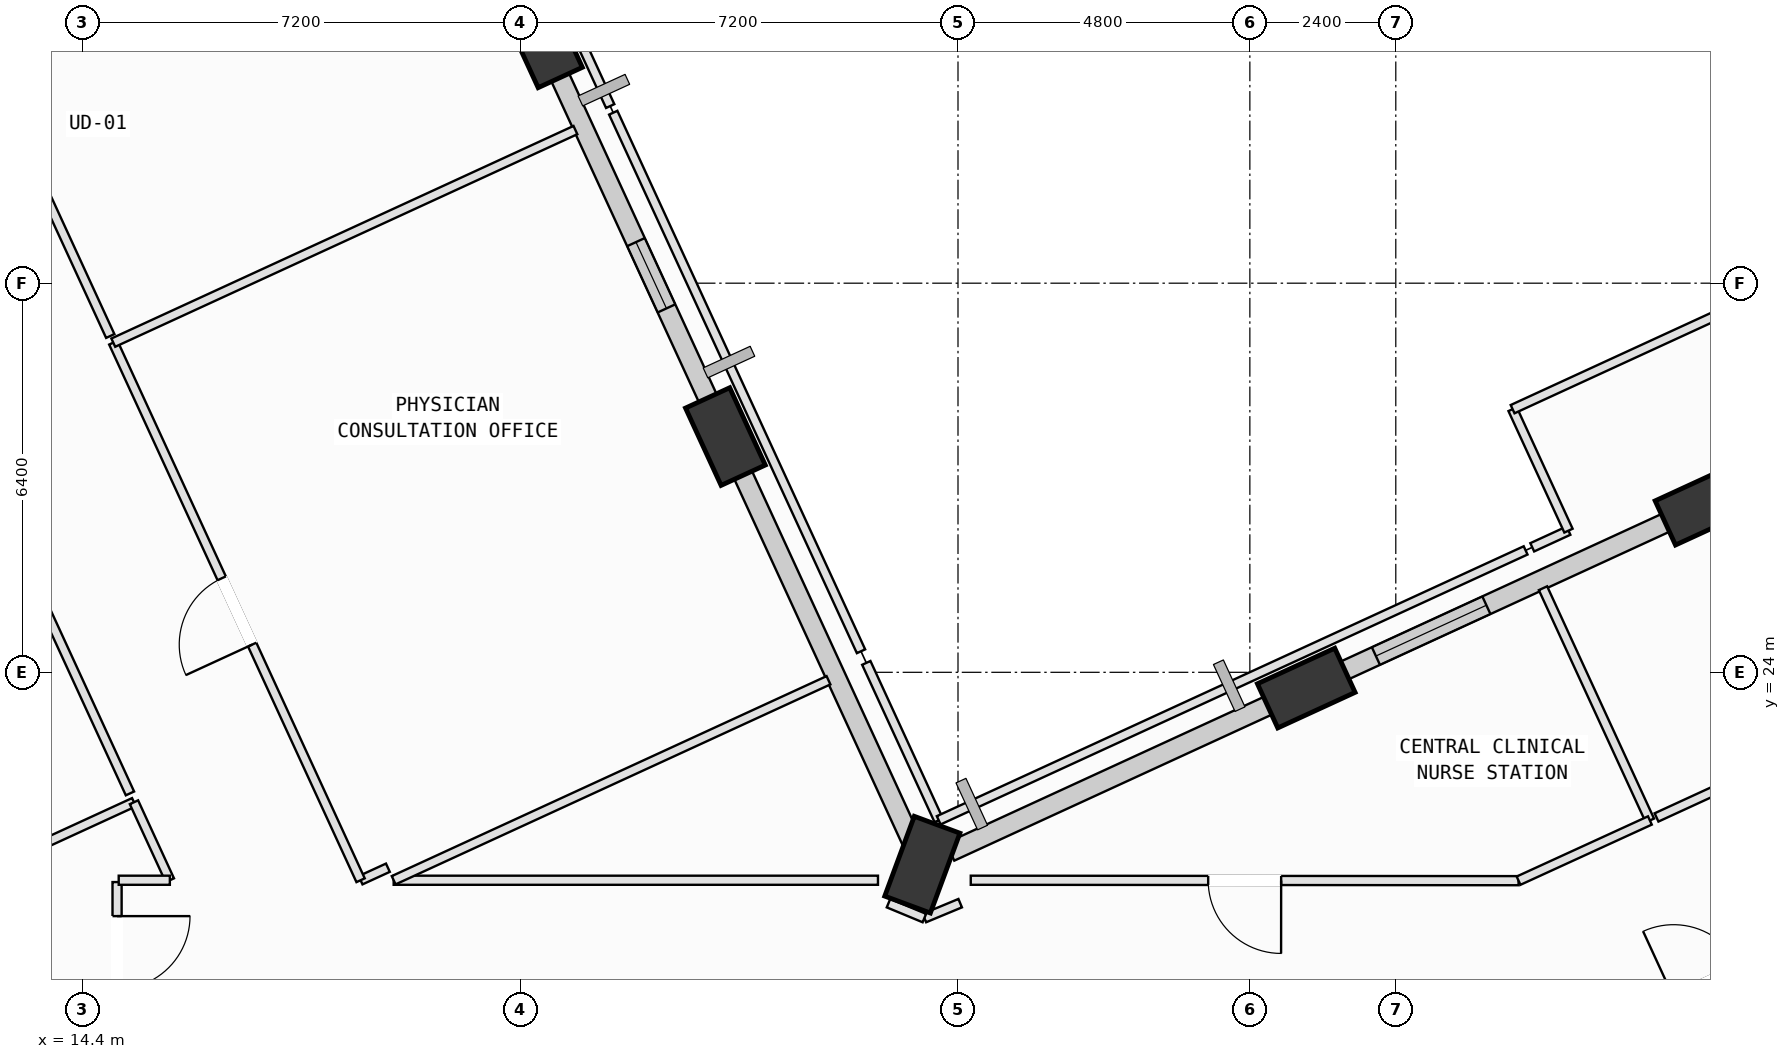
"""IFC4 building model, lengths in metres.
Left out: names, types, materials, properties, quantities, classifications, styles, units other than length and angle.
Written with IfcOpenShell. Run it as: python <this file> out.ifc"""

import sys

from ifc_helpers import new_model, si_unit, direction, frame, frame_2d, origin, origin_2d, place, context, subcontext, project, spatial, rectangle, extrude, element, fill, save


model = new_model("IFC4")
c1 = context("Model", 3, precision=1e-05, world=origin(), true_north=direction((0.0, 1.0)))
c2 = subcontext(c1, "Body", "Model", "MODEL_VIEW")
j1 = project(units=[si_unit("LENGTHUNIT", "METRE"), si_unit("PLANEANGLEUNIT", "RADIAN")], contexts=[c1])
p1 = place(None, origin())
s1 = spatial("IfcSite", under=j1, at=p1, CompositionType="ELEMENT")
p2 = place(p1, origin())
s2 = spatial("IfcBuilding", under=s1, at=p2, CompositionType="ELEMENT")
p3 = place(p2, frame((0.0, 0.0, 128.4)))
s3 = spatial("IfcBuildingStorey", under=s2, at=p3, CompositionType="ELEMENT", Elevation=128.4)
p4 = place(p3, frame((41.069, 26.749, 0.002), z_axis=(-0.0083651903, 0.030896250305, 0.999487591373), x_axis=(-0.76778425247, -0.640568841892, 0.013375367549)))
e1 = element("IfcColumn", 1, at=p4, inside=s3, PredefinedType="COLUMN", context=c2, shape_type="SweptSolid", body=[
    extrude(rectangle(XDim=1.4, YDim=0.8, at=origin_2d()), origin(), (0.0, 0.0, 1.0), 3.998),
])
p5 = place(p3, frame((34.528, 23.741, 0.002), z_axis=(0.004337394239, 0.003848673761, 0.999983187219), x_axis=(-0.915540928611, 0.402217524022, 0.002423098657)))
e2 = element("IfcColumn", 2, at=p5, inside=s3, PredefinedType="COLUMN", context=c2, shape_type="SweptSolid", body=[
    extrude(rectangle(XDim=1.4, YDim=0.8, at=origin_2d()), origin(), (0.0, 0.0, 1.0), 3.996),
])
p6 = place(p3, frame((28.213, 20.836, 0.002), z_axis=(0.016610399314, -0.022167554967, 0.999616273448), x_axis=(-0.284546396124, 0.958310178837, 0.025979791964)))
e3 = element("IfcColumn", 3, at=p6, inside=s3, PredefinedType="COLUMN", context=c2, shape_type="SweptSolid", body=[
    extrude(rectangle(XDim=1.4, YDim=0.8, at=origin_2d()), origin(), (0.0, 0.0, 1.0), 3.998),
])
p7 = place(p3, frame((24.975, 27.877, 0.002), z_axis=(-0.012453610314, -0.035834653208, 0.999280133506), x_axis=(-0.096688222569, 0.994717788265, 0.034466060499)))
e4 = element("IfcColumn", 4, at=p7, inside=s3, PredefinedType="COLUMN", context=c2, shape_type="SweptSolid", body=[
    extrude(rectangle(XDim=1.4, YDim=0.8, at=origin_2d()), origin(), (0.0, 0.0, 1.0), 3.999),
])
p8 = place(p3, frame((21.966, 34.419, 0.002), z_axis=(-0.039387790882, -0.048472590946, 0.998047598993), x_axis=(0.247513343788, 0.9672214419, 0.056743519237)))
e5 = element("IfcColumn", 5, at=p8, inside=s3, PredefinedType="COLUMN", context=c2, shape_type="SweptSolid", body=[
    extrude(rectangle(XDim=1.4, YDim=0.8, at=origin_2d()), origin(), (0.0, 0.0, 1.0), 4.004),
])
p9 = place(p3, frame((34.989, 23.953, 0.0), z_axis=(0.0, 0.0, 1.0), x_axis=(0.908505077116, 0.417873814512, 0.0)))
e6 = element("IfcWall", 6, at=p9, inside=s3, PredefinedType="SOLIDWALL", context=c2, shape_type="SweptSolid", body=[
    extrude(rectangle(XDim=6.211, YDim=0.32, at=frame_2d((3.105, 0.0))), origin(), (0.0, 0.0, 1.0), 3.165),
])
p10 = place(p9, frame((0.753, 0.0, 0.75)))
e7 = element("IfcOpeningElement", 7, at=p10, cuts=e6, PredefinedType="OPENING", context=c2, shape_type="SweptSolid", body=[
    extrude(rectangle(XDim=2.0, YDim=1.95, at=frame_2d((1.0, 0.975))), frame((0.0, 0.17, 0.0), z_axis=(0.0, -1.0, 0.0), x_axis=(1.0, 0.0, 0.0)), (0.0, 0.0, 1.0), 0.34),
])
p11 = place(p3, frame((28.672, 21.048, 0.0), z_axis=(0.0, 0.0, 1.0), x_axis=(0.908511291262, 0.417860303989, 0.0)))
e8 = element("IfcWall", 8, at=p11, inside=s3, PredefinedType="SOLIDWALL", context=c2, shape_type="SweptSolid", body=[
    extrude(rectangle(XDim=5.96, YDim=0.32, at=frame_2d((2.98, 0.0))), origin(), (0.0, 0.0, 1.0), 3.165),
])
p12 = place(p3, frame((25.204, 27.379, 0.0), z_axis=(0.0, 0.0, 1.0), x_axis=(0.417853145671, -0.908514583621, 0.0)))
e9 = element("IfcWall", 9, at=p12, inside=s3, PredefinedType="SOLIDWALL", context=c2, shape_type="SweptSolid", body=[
    extrude(rectangle(XDim=6.76, YDim=0.32, at=frame_2d((3.38, 0.0))), origin(), (0.0, 0.0, 1.0), 3.165),
])
p13 = place(p3, frame((22.191, 33.929, 0.0), z_axis=(0.0, 0.0, 1.0), x_axis=(0.417833720383, -0.908523517643, 0.0)))
e10 = element("IfcWall", 10, at=p13, inside=s3, PredefinedType="SOLIDWALL", context=c2, shape_type="SweptSolid", body=[
    extrude(rectangle(XDim=6.223, YDim=0.32, at=frame_2d((3.111, 0.0))), origin(), (0.0, 0.0, 1.0), 3.165),
])
p14 = place(p13, frame((3.141, 0.0, 0.75)))
e11 = element("IfcOpeningElement", 11, at=p14, cuts=e10, PredefinedType="OPENING", context=c2, shape_type="SweptSolid", body=[
    extrude(rectangle(XDim=1.2, YDim=1.75, at=frame_2d((0.6, 0.875))), frame((0.0, 0.17, 0.0), z_axis=(0.0, -1.0, 0.0), x_axis=(1.0, 0.0, 0.0)), (0.0, 0.0, 1.0), 0.34),
])
p15 = place(p3, frame((36.5, 16.778, 0.0), z_axis=(0.0, 0.0, 1.0), x_axis=(0.908527682077, 0.417824665261, 0.0)))
e12 = element("IfcWall", 12, at=p15, inside=s3, PredefinedType="PARTITIONING", context=c2, shape_type="SweptSolid", body=[
    extrude(rectangle(XDim=10.157, YDim=0.15, at=frame_2d((5.079, 0.0))), origin(), (0.0, 0.0, 1.0), 2.965),
])
p16 = place(p15, frame((4.479, 0.0, 0.0)))
e13 = element("IfcOpeningElement", 13, at=p16, cuts=e12, PredefinedType="OPENING", context=c2, shape_type="SweptSolid", body=[
    extrude(rectangle(XDim=1.2, YDim=2.15, at=frame_2d((0.6, 1.075))), frame((0.0, 0.085, 0.0), z_axis=(0.0, -1.0, 0.0), x_axis=(1.0, 0.0, 0.0)), (0.0, 0.0, 1.0), 0.17),
])
p17 = place(p3, frame((14.97, 20.55, 0.0), z_axis=(0.0, 0.0, 1.0), x_axis=(0.0, -1.0, 0.0)))
e14 = element("IfcWall", 14, at=p17, inside=s3, PredefinedType="PARTITIONING", context=c2, shape_type="SweptSolid", body=[
    extrude(rectangle(XDim=2.32, YDim=0.15, at=frame_2d((1.16, 0.0))), origin(), (0.0, 0.0, 1.0), 2.965),
])
p18 = place(p17, frame((0.56, 0.0, 0.0)))
e15 = element("IfcOpeningElement", 15, at=p18, cuts=e14, PredefinedType="OPENING", context=c2, shape_type="SweptSolid", body=[
    extrude(rectangle(XDim=1.2, YDim=2.15, at=frame_2d((0.6, 1.075))), frame((0.0, 0.085, 0.0), z_axis=(0.0, -1.0, 0.0), x_axis=(1.0, 0.0, 0.0)), (0.0, 0.0, 1.0), 0.17),
])
p19 = place(p3, frame((6.695, 17.929, 0.0), z_axis=(0.0, 0.0, 1.0), x_axis=(0.908502070269, 0.417880351677, 0.0)))
e16 = element("IfcWall", 16, at=p19, inside=s3, PredefinedType="PARTITIONING", context=c2, shape_type="SweptSolid", body=[
    extrude(rectangle(XDim=9.414, YDim=0.15, at=frame_2d((4.707, 0.0))), origin(), (0.0, 0.0, 1.0), 3.78),
])
p20 = place(p3, frame((15.248, 21.863, 0.0), z_axis=(0.0, 0.0, 1.0), x_axis=(0.417720087302, -0.908575769358, 0.0)))
e17 = element("IfcWall", 17, at=p20, inside=s3, PredefinedType="PARTITIONING", context=c2, shape_type="SweptSolid", body=[
    extrude(rectangle(XDim=1.412, YDim=0.15, at=frame_2d((0.706, 0.0))), origin(), (0.0, 0.0, 1.0), 3.78),
])
p21 = place(p3, frame((15.838, 20.58, 0.0), z_axis=(0.0, 0.0, 1.0), x_axis=(-1.0, 0.0, 0.0)))
e18 = element("IfcWall", 18, at=p21, inside=s3, PredefinedType="PARTITIONING", context=c2, shape_type="SweptSolid", body=[
    extrude(rectangle(XDim=0.841, YDim=0.15, at=frame_2d((0.42, 0.0))), origin(), (0.0, 0.0, 1.0), 3.78),
])
p22 = place(p3, frame((9.649, 34.037, 0.0), z_axis=(0.0, 0.0, 1.0), x_axis=(0.417880345161, -0.908502073266, 0.0)))
e19 = element("IfcWall", 19, at=p22, inside=s3, PredefinedType="PARTITIONING", context=c2, shape_type="SweptSolid", body=[
    extrude(rectangle(XDim=13.24, YDim=0.15, at=frame_2d((6.62, 0.0))), origin(), (0.0, 0.0, 1.0), 2.965),
])
p23 = place(p22, frame((6.02, 0.0, 0.0)))
e20 = element("IfcOpeningElement", 20, at=p23, cuts=e19, PredefinedType="OPENING", context=c2, shape_type="SweptSolid", body=[
    extrude(rectangle(XDim=1.2, YDim=2.15, at=frame_2d((0.6, 1.075))), frame((0.0, 0.085, 0.0), z_axis=(0.0, -1.0, 0.0), x_axis=(1.0, 0.0, 0.0)), (0.0, 0.0, 1.0), 0.17),
])
p24 = place(p3, frame((38.019, 20.573, 0.0), z_axis=(0.0, 0.0, 1.0), x_axis=(-0.999999691191, 0.000785886319, 0.0)))
e21 = element("IfcWall", 21, at=p24, inside=s3, PredefinedType="PARTITIONING", context=c2, shape_type="SweptSolid", body=[
    extrude(rectangle(XDim=9.009, YDim=0.15, at=frame_2d((4.504, 0.0))), origin(), (0.0, 0.0, 1.0), 3.365),
])
p25 = place(p24, frame((3.905, 0.0, 0.0)))
e22 = element("IfcOpeningElement", 22, at=p25, cuts=e21, PredefinedType="OPENING", context=c2, shape_type="SweptSolid", body=[
    extrude(rectangle(XDim=1.2, YDim=2.15, at=frame_2d((0.6, 1.075))), frame((0.0, 0.085, 0.0), z_axis=(0.0, -1.0, 0.0), x_axis=(1.0, 0.0, 0.0)), (0.0, 0.0, 1.0), 0.17),
])
p26 = place(p3, frame((28.836, 20.203, 0.0), z_axis=(0.0, 0.0, 1.0), x_axis=(-0.92334851348, -0.383962918333, 0.0)))
e23 = element("IfcWall", 23, at=p26, inside=s3, PredefinedType="PARTITIONING", context=c2, shape_type="SweptSolid", body=[
    extrude(rectangle(XDim=0.638, YDim=0.15, at=frame_2d((0.319, 0.0))), origin(), (0.0, 0.0, 1.0), 3.78),
])
p27 = place(p3, frame((28.247, 19.958, 0.0), z_axis=(0.0, 0.0, 1.0), x_axis=(-0.923629954024, 0.383285413275, 0.0)))
e24 = element("IfcWall", 24, at=p27, inside=s3, PredefinedType="PARTITIONING", context=c2, shape_type="SweptSolid", body=[
    extrude(rectangle(XDim=0.639, YDim=0.15, at=frame_2d((0.319, 0.0))), origin(), (0.0, 0.0, 1.0), 3.78),
])
p28 = place(p3, frame((27.484, 20.58, 0.0), z_axis=(0.0, 0.0, 1.0), x_axis=(-1.0, 0.0, 0.0)))
e25 = element("IfcWall", 25, at=p28, inside=s3, PredefinedType="PARTITIONING", context=c2, shape_type="SweptSolid", body=[
    extrude(rectangle(XDim=7.965, YDim=0.15, at=frame_2d((3.982, 0.0))), origin(), (0.0, 0.0, 1.0), 3.78),
])
p29 = place(p3, frame((19.519, 20.58, 0.0), z_axis=(0.0, 0.0, 1.0), x_axis=(0.908518713995, 0.417844165115, 0.0)))
e26 = element("IfcWall", 26, at=p29, inside=s3, PredefinedType="PARTITIONING", context=c2, shape_type="SweptSolid", body=[
    extrude(rectangle(XDim=7.871, YDim=0.15, at=frame_2d((3.936, 0.0))), origin(), (0.0, 0.0, 1.0), 3.78),
])
p30 = place(p3, frame((27.292, 24.155, 0.0), z_axis=(0.0, 0.0, 1.0), x_axis=(0.417884396376, -0.908500209833, 0.0)))
e27 = element("IfcWall", 27, at=p30, inside=s3, PredefinedType="PARTITIONING", context=c2, shape_type="SweptSolid", body=[
    extrude(rectangle(XDim=2.85, YDim=0.15, at=frame_2d((1.425, 0.0))), origin(), (0.0, 0.0, 1.0), 3.78),
])
p31 = place(p3, frame((28.483, 21.566, 0.0), z_axis=(0.0, 0.0, 1.0), x_axis=(0.908526220932, 0.417827842393, 0.0)))
e28 = element("IfcWall", 28, at=p31, inside=s3, PredefinedType="PARTITIONING", context=c2, shape_type="SweptSolid", body=[
    extrude(rectangle(XDim=10.624, YDim=0.15, at=frame_2d((5.312, 0.0))), origin(), (0.0, 0.0, 1.0), 3.78),
])
p32 = place(p3, frame((38.421, 25.383, 0.0), z_axis=(0.0, 0.0, 1.0), x_axis=(0.418067562833, -0.908415936071, 0.0)))
e29 = element("IfcWall", 29, at=p32, inside=s3, PredefinedType="PARTITIONING", context=c2, shape_type="SweptSolid", body=[
    extrude(rectangle(XDim=4.205, YDim=0.15, at=frame_2d((2.103, 0.0))), origin(), (0.0, 0.0, 1.0), 3.78),
])
p33 = place(p3, frame((40.179, 21.563, 0.0), z_axis=(0.0, 0.0, 1.0), x_axis=(-0.90905995789, -0.416665324884, 0.0)))
e30 = element("IfcWall", 30, at=p33, inside=s3, PredefinedType="PARTITIONING", context=c2, shape_type="SweptSolid", body=[
    extrude(rectangle(XDim=2.376, YDim=0.15, at=frame_2d((1.188, 0.0))), origin(), (0.0, 0.0, 1.0), 2.945),
])
p34 = place(p3, frame((55.678, 28.692, 0.0), z_axis=(0.0, 0.0, 1.0), x_axis=(-0.908501505358, -0.417881579832, 0.0)))
e31 = element("IfcWall", 31, at=p34, inside=s3, PredefinedType="PARTITIONING", context=c2, shape_type="SweptSolid", body=[
    extrude(rectangle(XDim=16.94, YDim=0.15, at=frame_2d((8.47, 0.0))), origin(), (0.0, 0.0, 1.0), 2.945),
])
p35 = place(p34, frame((7.87, 0.0, 0.0)))
e32 = element("IfcOpeningElement", 32, at=p35, cuts=e31, PredefinedType="OPENING", context=c2, shape_type="SweptSolid", body=[
    extrude(rectangle(XDim=1.2, YDim=2.15, at=frame_2d((0.6, 1.075))), frame((0.0, 0.085, 0.0), z_axis=(0.0, -1.0, 0.0), x_axis=(1.0, 0.0, 0.0)), (0.0, 0.0, 1.0), 0.17),
])
p36 = place(p3, frame((38.244, 26.056, 0.0), z_axis=(0.0, 0.0, 1.0), x_axis=(0.908535648033, 0.417807343465, 0.0)))
e33 = element("IfcWall", 33, at=p36, inside=s3, PredefinedType="PARTITIONING", context=c2, shape_type="SweptSolid", body=[
    extrude(rectangle(XDim=0.656, YDim=0.15, at=frame_2d((0.328, 0.0))), origin(), (0.0, 0.0, 1.0), 3.78),
])
p37 = place(p3, frame((38.84, 26.33, 0.0), z_axis=(0.0, 0.0, 1.0), x_axis=(-0.417980742424, 0.908455887186, 0.0)))
e34 = element("IfcWall", 34, at=p37, inside=s3, PredefinedType="PARTITIONING", context=c2, shape_type="SweptSolid", body=[
    extrude(rectangle(XDim=2.199, YDim=0.15, at=frame_2d((1.1, 0.0))), origin(), (0.0, 0.0, 1.0), 3.78),
])
p38 = place(p3, frame((37.921, 28.328, 0.0), z_axis=(0.0, 0.0, 1.0), x_axis=(0.908481698238, 0.4179246391, 0.0)))
e35 = element("IfcWall", 35, at=p38, inside=s3, PredefinedType="PARTITIONING", context=c2, shape_type="SweptSolid", body=[
    extrude(rectangle(XDim=7.2, YDim=0.15, at=frame_2d((3.6, 0.0))), origin(), (0.0, 0.0, 1.0), 3.78),
])
p39 = place(p3, frame((19.424, 20.786, 0.0), z_axis=(0.0, 0.0, 1.0), x_axis=(-0.909041417837, -0.416705772287, 0.0)))
e36 = element("IfcWall", 36, at=p39, inside=s3, PredefinedType="PARTITIONING", context=c2, shape_type="SweptSolid", body=[
    extrude(rectangle(XDim=0.494, YDim=0.15, at=frame_2d((0.247, 0.0))), origin(), (0.0, 0.0, 1.0), 3.78),
])
p40 = place(p3, frame((18.975, 20.58, 0.0), z_axis=(0.0, 0.0, 1.0), x_axis=(-0.417888630953, 0.908498262035, 0.0)))
e37 = element("IfcWall", 37, at=p40, inside=s3, PredefinedType="PARTITIONING", context=c2, shape_type="SweptSolid", body=[
    extrude(rectangle(XDim=9.733, YDim=0.15, at=frame_2d((4.866, 0.0))), origin(), (0.0, 0.0, 1.0), 3.78),
])
p41 = place(p40, frame((4.266, 0.0, 0.0)))
e38 = element("IfcOpeningElement", 38, at=p41, cuts=e37, PredefinedType="OPENING", context=c2, shape_type="SweptSolid", body=[
    extrude(rectangle(XDim=1.2, YDim=2.15, at=frame_2d((0.6, 1.075))), frame((0.0, 0.085, 0.0), z_axis=(0.0, -1.0, 0.0), x_axis=(1.0, 0.0, 0.0)), (0.0, 0.0, 1.0), 0.17),
])
p42 = place(p3, frame((14.908, 29.422, 0.0), z_axis=(0.0, 0.0, 1.0), x_axis=(0.908499316562, 0.417886338383, 0.0)))
e39 = element("IfcWall", 39, at=p42, inside=s3, PredefinedType="PARTITIONING", context=c2, shape_type="SweptSolid", body=[
    extrude(rectangle(XDim=8.365, YDim=0.15, at=frame_2d((4.183, 0.0))), origin(), (0.0, 0.0, 1.0), 3.78),
])
p43 = place(p3, frame((23.13, 33.204, 0.0), z_axis=(0.0, 0.0, 1.0), x_axis=(0.417943219407, -0.908473150595, 0.0)))
e40 = element("IfcWall", 40, at=p43, inside=s3, PredefinedType="PARTITIONING", context=c2, shape_type="SweptSolid", body=[
    extrude(rectangle(XDim=9.75, YDim=0.15, at=frame_2d((4.875, 0.0))), origin(), (0.0, 0.0, 1.0), 3.78),
])
p44 = place(p3, frame((14.858, 29.531, 0.0), z_axis=(0.0, 0.0, 1.0), x_axis=(-0.417891651322, 0.908496872727, 0.0)))
e41 = element("IfcWall", 41, at=p44, inside=s3, PredefinedType="PARTITIONING", context=c2, shape_type="SweptSolid", body=[
    extrude(rectangle(XDim=6.93, YDim=0.15, at=frame_2d((3.465, 0.0))), origin(), (0.0, 0.0, 1.0), 3.78),
])
p45 = place(p44, frame((3.005, 0.0, 0.0)))
e42 = element("IfcOpeningElement", 42, at=p45, cuts=e41, PredefinedType="OPENING", context=c2, shape_type="SweptSolid", body=[
    extrude(rectangle(XDim=0.92, YDim=2.1, at=frame_2d((0.46, 1.05))), frame((0.0, 0.085, 0.0), z_axis=(0.0, -1.0, 0.0), x_axis=(1.0, 0.0, 0.0)), (0.0, 0.0, 1.0), 0.17),
])
p46 = place(p3, frame((20.184, 39.609, 0.0), z_axis=(0.0, 0.0, 1.0), x_axis=(0.417891651322, -0.908496872727, 0.0)))
e43 = element("IfcWall", 43, at=p46, inside=s3, PredefinedType="PARTITIONING", context=c2, shape_type="SweptSolid", body=[
    extrude(rectangle(XDim=6.93, YDim=0.15, at=frame_2d((3.465, 0.0))), origin(), (0.0, 0.0, 1.0), 3.78),
])
p47 = place(p10, origin())
e44 = element("IfcWindow", 44, at=p47, inside=s3, PartitioningType="SINGLE_PANEL", PredefinedType="WINDOW", context=c2, shape_type="SweptSolid", body=[
    extrude(rectangle(XDim=2.0, YDim=1.95, at=frame_2d((1.0, 0.975))), frame((0.0, 0.03, 0.0), z_axis=(0.0, -1.0, 0.0), x_axis=(1.0, 0.0, 0.0)), (0.0, 0.0, 1.0), 0.06),
])
fill(e7, e44)
p48 = place(p14, origin())
e45 = element("IfcWindow", 45, at=p48, inside=s3, PartitioningType="SINGLE_PANEL", PredefinedType="WINDOW", context=c2, shape_type="SweptSolid", body=[
    extrude(rectangle(XDim=1.2, YDim=1.75, at=frame_2d((0.6, 0.875))), frame((0.0, 0.03, 0.0), z_axis=(0.0, -1.0, 0.0), x_axis=(1.0, 0.0, 0.0)), (0.0, 0.0, 1.0), 0.06),
])
fill(e11, e45)
p49 = place(p16, origin())
e46 = element("IfcDoor", 46, at=p49, inside=s3, OperationType="SINGLE_SWING_LEFT", PredefinedType="DOOR", context=c2, shape_type="SweptSolid", body=[
    extrude(rectangle(XDim=1.2, YDim=2.15, at=frame_2d((0.6, 1.075))), frame((0.0, 0.025, 0.0), z_axis=(0.0, -1.0, 0.0), x_axis=(1.0, 0.0, 0.0)), (0.0, 0.0, 1.0), 0.05),
])
fill(e13, e46)
p50 = place(p18, origin())
e47 = element("IfcDoor", 47, at=p50, inside=s3, OperationType="SINGLE_SWING_LEFT", PredefinedType="DOOR", context=c2, shape_type="SweptSolid", body=[
    extrude(rectangle(XDim=1.2, YDim=2.15, at=frame_2d((0.6, 1.075))), frame((0.0, 0.025, 0.0), z_axis=(0.0, -1.0, 0.0), x_axis=(1.0, 0.0, 0.0)), (0.0, 0.0, 1.0), 0.05),
])
fill(e15, e47)
p51 = place(p25, origin())
e48 = element("IfcDoor", 48, at=p51, inside=s3, OperationType="SINGLE_SWING_LEFT", PredefinedType="DOOR", context=c2, shape_type="SweptSolid", body=[
    extrude(rectangle(XDim=1.2, YDim=2.15, at=frame_2d((0.6, 1.075))), frame((0.0, 0.025, 0.0), z_axis=(0.0, -1.0, 0.0), x_axis=(1.0, 0.0, 0.0)), (0.0, 0.0, 1.0), 0.05),
])
fill(e22, e48)
p52 = place(p41, origin())
e49 = element("IfcDoor", 49, at=p52, inside=s3, OperationType="SINGLE_SWING_LEFT", PredefinedType="DOOR", context=c2, shape_type="SweptSolid", body=[
    extrude(rectangle(XDim=1.2, YDim=2.15, at=frame_2d((0.6, 1.075))), frame((0.0, 0.025, 0.0), z_axis=(0.0, -1.0, 0.0), x_axis=(1.0, 0.0, 0.0)), (0.0, 0.0, 1.0), 0.05),
])
fill(e38, e49)
save(model, sys.argv[1])
